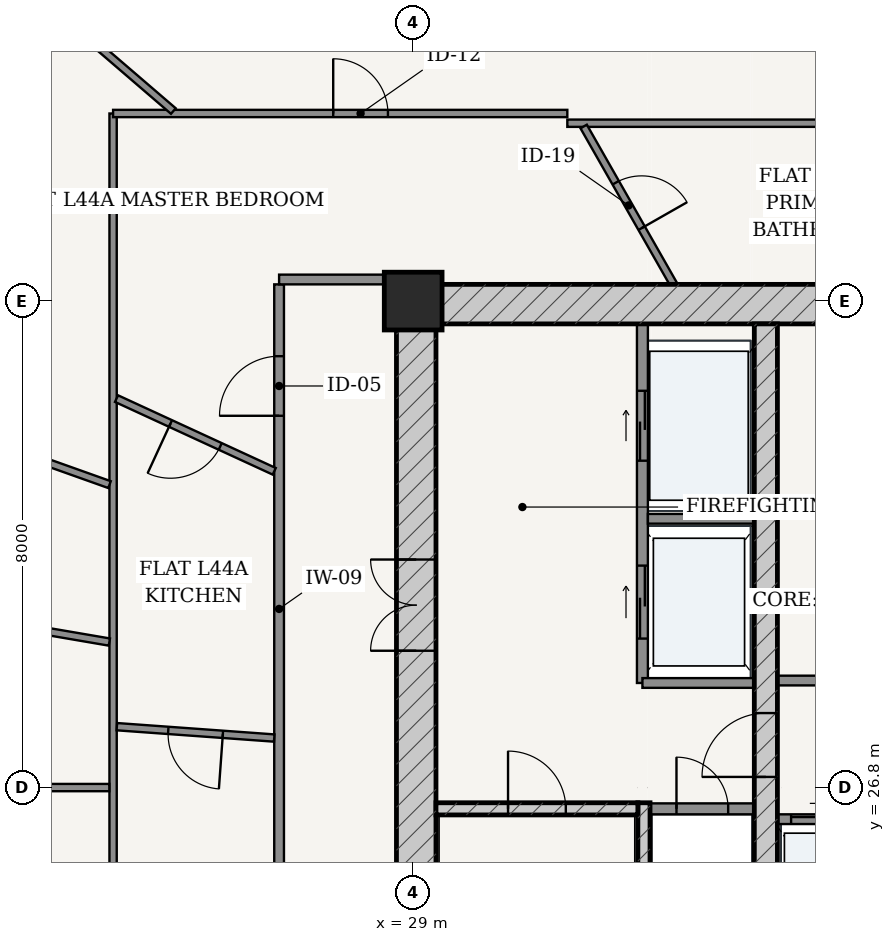
"""IFC4 building model, lengths in metres.
Left out: names, types, materials, properties, quantities, classifications, styles, units other than length and angle.
Written with IfcOpenShell. Run it as: python <this file> out.ifc"""

import sys

from ifc_helpers import new_model, si_unit, direction, frame, frame_2d, origin, origin_2d, place, context, subcontext, project, spatial, rectangle, extrude, source, transform, mapped, element, fill, save


model = new_model("IFC4")
c1 = context("Model", 3, precision=1e-05, world=origin(), true_north=direction((-0.2419218956, 0.970295726276)))
c2 = subcontext(c1, "Body", "Model", "MODEL_VIEW")
j1 = project(units=[si_unit("LENGTHUNIT", "METRE"), si_unit("PLANEANGLEUNIT", "RADIAN")], contexts=[c1])
p1 = place(None, origin())
s1 = spatial("IfcSite", under=j1, at=p1, CompositionType="ELEMENT")
p2 = place(p1, origin())
s2 = spatial("IfcBuilding", under=s1, at=p2, CompositionType="ELEMENT")
p3 = place(p2, frame((0.0, 0.0, 167.8)))
s3 = spatial("IfcBuildingStorey", under=s2, at=p3, CompositionType="ELEMENT", Elevation=167.8)
p4 = place(p3, frame((29.0, 34.8, 0.0), z_axis=(0.0, 0.0, 1.0), x_axis=(1.0, 0.0, 0.0)))
e1 = element("IfcColumn", 1, at=p4, inside=s3, PredefinedType="COLUMN", context=c2, shape_type="SweptSolid", body=[
    extrude(rectangle(XDim=0.95, YDim=0.95, at=origin_2d()), origin(), (0.0, 0.0, 1.0), 3.6),
])
p5 = place(p3, frame((28.725, 34.75, 0.0), z_axis=(0.0, 0.0, 1.0), x_axis=(1.0, 0.0, 0.0)))
e2 = element("IfcWall", 2, at=p5, inside=s3, PredefinedType="SHEAR", context=c2, shape_type="SweptSolid", body=[
    extrude(rectangle(XDim=18.55, YDim=0.65, at=frame_2d((9.275, 0.0))), origin(), (0.0, 0.0, 1.0), 3.33),
])
p6 = place(p3, frame((29.05, 19.175, 0.0), z_axis=(0.0, 0.0, 1.0), x_axis=(0.0, 1.0, 0.0)))
e3 = element("IfcWall", 3, at=p6, inside=s3, PredefinedType="SHEAR", context=c2, shape_type="SweptSolid", body=[
    extrude(rectangle(XDim=15.25, YDim=0.65, at=frame_2d((7.625, 0.0))), origin(), (0.0, 0.0, 1.0), 3.33),
])
p7 = place(p6, frame((9.875, 0.0, 0.0)))
e4 = element("IfcOpeningElement", 4, at=p7, cuts=e3, PredefinedType="OPENING", context=c2, shape_type="SweptSolid", body=[
    extrude(rectangle(XDim=1.5, YDim=2.2, at=frame_2d((0.75, 1.1))), frame((0.0, 0.335, 0.0), z_axis=(0.0, -1.0, 0.0), x_axis=(1.0, 0.0, 0.0)), (0.0, 0.0, 1.0), 0.67),
])
p8 = place(p3, frame((32.795, 19.175, 0.0), z_axis=(0.0, 0.0, 1.0), x_axis=(0.0, 1.0, 0.0)))
e5 = element("IfcWall", 5, at=p8, inside=s3, PredefinedType="SOLIDWALL", context=c2, shape_type="SweptSolid", body=[
    extrude(rectangle(XDim=7.375, YDim=0.2, at=frame_2d((3.688, 0.0))), origin(), (0.0, 0.0, 1.0), 3.33),
])
p9 = place(p3, frame((29.375, 26.45, 0.0), z_axis=(0.0, 0.0, 1.0), x_axis=(1.0, 0.0, 0.0)))
e6 = element("IfcWall", 6, at=p9, inside=s3, PredefinedType="SOLIDWALL", context=c2, shape_type="SweptSolid", body=[
    extrude(rectangle(XDim=3.32, YDim=0.2, at=frame_2d((1.66, 0.0))), origin(), (0.0, 0.0, 1.0), 3.33),
])
p10 = place(p9, frame((1.185, 0.0, 0.0)))
e7 = element("IfcOpeningElement", 7, at=p10, cuts=e6, PredefinedType="OPENING", context=c2, shape_type="SweptSolid", body=[
    extrude(rectangle(XDim=0.95, YDim=2.15, at=frame_2d((0.475, 1.075))), frame((0.0, 0.11, 0.0), z_axis=(0.0, -1.0, 0.0), x_axis=(1.0, 0.0, 0.0)), (0.0, 0.0, 1.0), 0.22),
])
p11 = place(p3, frame((34.8, 19.175, 0.0), z_axis=(0.0, 0.0, 1.0), x_axis=(0.0, 1.0, 0.0)))
e8 = element("IfcWall", 8, at=p11, inside=s3, PredefinedType="SHEAR", context=c2, shape_type="SweptSolid", body=[
    extrude(rectangle(XDim=15.25, YDim=0.38, at=frame_2d((7.625, 0.0))), origin(), (0.0, 0.0, 1.0), 3.33),
])
p12 = place(p11, frame((7.8, 0.0, 0.0)))
e9 = element("IfcOpeningElement", 9, at=p12, cuts=e8, PredefinedType="OPENING", context=c2, shape_type="SweptSolid", body=[
    extrude(rectangle(XDim=1.05, YDim=2.15, at=frame_2d((0.525, 1.075))), frame((0.0, 0.2, 0.0), z_axis=(0.0, -1.0, 0.0), x_axis=(1.0, 0.0, 0.0)), (0.0, 0.0, 1.0), 0.4),
])
p13 = place(p3, frame((24.633, 44.122, 0.0), z_axis=(0.0, 0.0, 1.0), x_axis=(-0.75843401647, -0.651749831348, 0.0)))
e10 = element("IfcWall", 10, at=p13, inside=s3, PredefinedType="SOLIDWALL", context=c2, shape_type="SweptSolid", body=[
    extrude(rectangle(XDim=8.952, YDim=0.28, at=frame_2d((4.476, 0.0))), origin(), (0.0, 0.0, 1.0), 3.33),
])
p14 = place(p13, frame((1.367, 0.0, 0.85)))
e11 = element("IfcOpeningElement", 11, at=p14, cuts=e10, PredefinedType="OPENING", context=c2, shape_type="SweptSolid", body=[
    extrude(rectangle(XDim=2.1, YDim=1.95, at=frame_2d((1.05, 0.975))), frame((0.0, 0.15, 0.0), z_axis=(0.0, -1.0, 0.0), x_axis=(1.0, 0.0, 0.0)), (0.0, 0.0, 1.0), 0.3),
])
p15 = place(p13, frame((5.485, 0.0, 0.85)))
e12 = element("IfcOpeningElement", 12, at=p15, cuts=e10, PredefinedType="OPENING", context=c2, shape_type="SweptSolid", body=[
    extrude(rectangle(XDim=2.1, YDim=1.95, at=frame_2d((1.05, 0.975))), frame((0.0, 0.15, 0.0), z_axis=(0.0, -1.0, 0.0), x_axis=(1.0, 0.0, 0.0)), (0.0, 0.0, 1.0), 0.3),
])
p16 = place(p3, frame((32.9, 26.45, 0.0), z_axis=(0.0, 0.0, 1.0), x_axis=(1.0, 0.0, 0.0)))
e13 = element("IfcWall", 13, at=p16, inside=s3, PredefinedType="PARTITIONING", context=c2, shape_type="SweptSolid", body=[
    extrude(rectangle(XDim=1.71, YDim=0.18, at=frame_2d((0.855, 0.0))), origin(), (0.0, 0.0, 1.0), 3.33),
])
p17 = place(p16, frame((0.43, 0.0, 0.0)))
e14 = element("IfcOpeningElement", 14, at=p17, cuts=e13, PredefinedType="OPENING", context=c2, shape_type="SweptSolid", body=[
    extrude(rectangle(XDim=0.85, YDim=2.1, at=frame_2d((0.425, 1.05))), frame((0.0, 0.1, 0.0), z_axis=(0.0, -1.0, 0.0), x_axis=(1.0, 0.0, 0.0)), (0.0, 0.0, 1.0), 0.2),
])
p18 = place(p3, frame((32.77, 28.52, 0.0), z_axis=(0.0, 0.0, 1.0), x_axis=(0.0, 1.0, 0.0)))
e15 = element("IfcWall", 15, at=p18, inside=s3, PredefinedType="PARTITIONING", context=c2, shape_type="SweptSolid", body=[
    extrude(rectangle(XDim=5.905, YDim=0.18, at=frame_2d((2.953, 0.0))), origin(), (0.0, 0.0, 1.0), 3.33),
])
p19 = place(p18, frame((3.655, 0.0, 0.0)))
e16 = element("IfcOpeningElement", 16, at=p19, cuts=e15, PredefinedType="OPENING", context=c2, shape_type="SweptSolid", body=[
    extrude(rectangle(XDim=1.15, YDim=2.2, at=frame_2d((0.575, 1.1))), frame((0.0, 0.1, 0.0), z_axis=(0.0, -1.0, 0.0), x_axis=(1.0, 0.0, 0.0)), (0.0, 0.0, 1.0), 0.2),
])
p20 = place(p18, frame((0.73, 0.0, 0.0)))
e17 = element("IfcOpeningElement", 17, at=p20, cuts=e15, PredefinedType="OPENING", context=c2, shape_type="SweptSolid", body=[
    extrude(rectangle(XDim=1.2, YDim=2.25, at=frame_2d((0.6, 1.125))), frame((0.0, 0.1, 0.0), z_axis=(0.0, -1.0, 0.0), x_axis=(1.0, 0.0, 0.0)), (0.0, 0.0, 1.0), 0.2),
])
p21 = place(p3, frame((32.86, 31.22, 0.0), z_axis=(0.0, 0.0, 1.0), x_axis=(1.0, 0.0, 0.0)))
e18 = element("IfcWall", 18, at=p21, inside=s3, PredefinedType="PARTITIONING", context=c2, shape_type="SweptSolid", body=[
    extrude(rectangle(XDim=1.75, YDim=0.16, at=frame_2d((0.875, 0.0))), origin(), (0.0, 0.0, 1.0), 3.33),
])
p22 = place(p3, frame((32.77, 28.52, 0.0), z_axis=(0.0, 0.0, 1.0), x_axis=(1.0, 0.0, 0.0)))
e19 = element("IfcWall", 19, at=p22, inside=s3, PredefinedType="PARTITIONING", context=c2, shape_type="SweptSolid", body=[
    extrude(rectangle(XDim=1.84, YDim=0.16, at=frame_2d((0.92, 0.0))), origin(), (0.0, 0.0, 1.0), 3.33),
])
p23 = place(p3, frame((34.99, 28.56, 0.0), z_axis=(0.0, 0.0, 1.0), x_axis=(1.0, 0.0, 0.0)))
e20 = element("IfcWall", 20, at=p23, inside=s3, PredefinedType="PARTITIONING", context=c2, shape_type="SweptSolid", body=[
    extrude(rectangle(XDim=6.02, YDim=0.16, at=frame_2d((3.01, 0.0))), origin(), (0.0, 0.0, 1.0), 3.33),
])
p24 = place(p23, frame((1.025, 0.0, 0.0)))
e21 = element("IfcOpeningElement", 21, at=p24, cuts=e20, PredefinedType="OPENING", context=c2, shape_type="SweptSolid", body=[
    extrude(rectangle(XDim=0.86, YDim=2.1, at=frame_2d((0.43, 1.05))), frame((0.0, 0.09, 0.0), z_axis=(0.0, -1.0, 0.0), x_axis=(1.0, 0.0, 0.0)), (0.0, 0.0, 1.0), 0.18),
])
p25 = place(p23, frame((4.14, 0.0, 0.0)))
e22 = element("IfcOpeningElement", 22, at=p25, cuts=e20, PredefinedType="OPENING", context=c2, shape_type="SweptSolid", body=[
    extrude(rectangle(XDim=0.85, YDim=2.1, at=frame_2d((0.425, 1.05))), frame((0.0, 0.09, 0.0), z_axis=(0.0, -1.0, 0.0), x_axis=(1.0, 0.0, 0.0)), (0.0, 0.0, 1.0), 0.18),
])
p26 = place(p3, frame((34.99, 26.28, 0.0), z_axis=(0.0, 0.0, 1.0), x_axis=(1.0, 0.0, 0.0)))
e23 = element("IfcWall", 23, at=p26, inside=s3, PredefinedType="PARTITIONING", context=c2, shape_type="SweptSolid", body=[
    extrude(rectangle(XDim=6.02, YDim=0.16, at=frame_2d((3.01, 0.0))), origin(), (0.0, 0.0, 1.0), 3.33),
])
p27 = place(p26, frame((0.225, 0.0, 0.0)))
e24 = element("IfcOpeningElement", 24, at=p27, cuts=e23, PredefinedType="OPENING", context=c2, shape_type="SweptSolid", body=[
    extrude(rectangle(XDim=1.1, YDim=2.2, at=frame_2d((0.55, 1.1))), frame((0.0, 0.09, 0.0), z_axis=(0.0, -1.0, 0.0), x_axis=(1.0, 0.0, 0.0)), (0.0, 0.0, 1.0), 0.18),
])
p28 = place(p26, frame((1.705, 0.0, 0.0)))
e25 = element("IfcOpeningElement", 25, at=p28, cuts=e23, PredefinedType="OPENING", context=c2, shape_type="SweptSolid", body=[
    extrude(rectangle(XDim=1.1, YDim=2.2, at=frame_2d((0.55, 1.1))), frame((0.0, 0.09, 0.0), z_axis=(0.0, -1.0, 0.0), x_axis=(1.0, 0.0, 0.0)), (0.0, 0.0, 1.0), 0.18),
])
p29 = place(p3, frame((26.795, 24.4, 0.0), z_axis=(0.0, 0.0, 1.0), x_axis=(0.0, 1.0, 0.0)))
e26 = element("IfcWall", 26, at=p29, inside=s3, PredefinedType="PARTITIONING", context=c2, shape_type="SweptSolid", body=[
    extrude(rectangle(XDim=10.675, YDim=0.16, at=frame_2d((5.337, 0.0))), origin(), (0.0, 0.0, 1.0), 2.776),
])
p30 = place(p29, frame((8.514, 0.0, 0.0)))
e27 = element("IfcOpeningElement", 27, at=p30, cuts=e26, PredefinedType="OPENING", context=c2, shape_type="SweptSolid", body=[
    extrude(rectangle(XDim=0.98, YDim=2.2, at=frame_2d((0.49, 1.1))), frame((0.0, 0.09, 0.0), z_axis=(0.0, -1.0, 0.0), x_axis=(1.0, 0.0, 0.0)), (0.0, 0.0, 1.0), 0.18),
])
p31 = place(p3, frame((26.795, 35.155, 0.0), z_axis=(0.0, 0.0, 1.0), x_axis=(1.0, 0.0, 0.0)))
e28 = element("IfcWall", 28, at=p31, inside=s3, PredefinedType="PARTITIONING", context=c2, shape_type="SweptSolid", body=[
    extrude(rectangle(XDim=1.93, YDim=0.16, at=frame_2d((0.965, 0.0))), origin(), (0.0, 0.0, 1.0), 2.776),
])
p32 = place(p3, frame((24.065, 21.59, 0.0), z_axis=(0.0, 0.0, 1.0), x_axis=(0.0, 1.0, 0.0)))
e29 = element("IfcWall", 29, at=p32, inside=s3, PredefinedType="PARTITIONING", context=c2, shape_type="SweptSolid", body=[
    extrude(rectangle(XDim=16.295, YDim=0.12, at=frame_2d((8.147, 0.0))), origin(), (0.0, 0.0, 1.0), 2.776),
])
p33 = place(p3, frame((24.065, 37.885, 0.0), z_axis=(0.0, 0.0, 1.0), x_axis=(1.0, 0.0, 0.0)))
e30 = element("IfcWall", 30, at=p33, inside=s3, PredefinedType="PARTITIONING", context=c2, shape_type="SweptSolid", body=[
    extrude(rectangle(XDim=7.47, YDim=0.12, at=frame_2d((3.735, 0.0))), origin(), (0.0, 0.0, 1.0), 2.776),
])
p34 = place(p33, frame((3.62, 0.0, 0.0)))
e31 = element("IfcOpeningElement", 31, at=p34, cuts=e30, PredefinedType="OPENING", context=c2, shape_type="SweptSolid", body=[
    extrude(rectangle(XDim=0.9, YDim=2.15, at=frame_2d((0.45, 1.075))), frame((0.0, 0.07, 0.0), z_axis=(0.0, -1.0, 0.0), x_axis=(1.0, 0.0, 0.0)), (0.0, 0.0, 1.0), 0.14),
])
p35 = place(p3, frame((31.535, 37.725, 0.0), z_axis=(0.0, 0.0, 1.0), x_axis=(1.0, 0.0, 0.0)))
e32 = element("IfcWall", 32, at=p35, inside=s3, PredefinedType="PARTITIONING", context=c2, shape_type="SweptSolid", body=[
    extrude(rectangle(XDim=6.363, YDim=0.12, at=frame_2d((3.182, 0.0))), origin(), (0.0, 0.0, 1.0), 2.776),
])
p36 = place(p3, frame((25.056, 37.925, 0.0), z_axis=(0.0, 0.0, 1.0), x_axis=(-0.758354915574, 0.65184186888, 0.0)))
e33 = element("IfcWall", 33, at=p36, inside=s3, PredefinedType="PARTITIONING", context=c2, shape_type="SweptSolid", body=[
    extrude(rectangle(XDim=5.432, YDim=0.12, at=frame_2d((2.716, 0.0))), origin(), (0.0, 0.0, 1.0), 2.846),
])
p37 = place(p36, frame((2.266, 0.0, 0.0)))
e34 = element("IfcOpeningElement", 34, at=p37, cuts=e33, PredefinedType="OPENING", context=c2, shape_type="SweptSolid", body=[
    extrude(rectangle(XDim=0.9, YDim=2.15, at=frame_2d((0.45, 1.075))), frame((0.0, 0.07, 0.0), z_axis=(0.0, -1.0, 0.0), x_axis=(1.0, 0.0, 0.0)), (0.0, 0.0, 1.0), 0.14),
])
p38 = place(p3, frame((24.007, 31.782, 0.0), z_axis=(0.0, 0.0, 1.0), x_axis=(-0.942077868165, 0.335394231187, 0.0)))
e35 = element("IfcWall", 35, at=p38, inside=s3, PredefinedType="PARTITIONING", context=c2, shape_type="SweptSolid", body=[
    extrude(rectangle(XDim=8.817, YDim=0.12, at=frame_2d((4.408, 0.0))), origin(), (0.0, 0.0, 1.0), 2.846),
])
p39 = place(p38, frame((3.958, 0.0, 0.0)))
e36 = element("IfcOpeningElement", 36, at=p39, cuts=e35, PredefinedType="OPENING", context=c2, shape_type="SweptSolid", body=[
    extrude(rectangle(XDim=0.9, YDim=2.15, at=frame_2d((0.45, 1.075))), frame((0.0, 0.07, 0.0), z_axis=(0.0, -1.0, 0.0), x_axis=(1.0, 0.0, 0.0)), (0.0, 0.0, 1.0), 0.14),
])
p40 = place(p3, frame((24.004, 29.193, 0.0), z_axis=(0.0, 0.0, 1.0), x_axis=(-0.985698378271, 0.168519159369, 0.0)))
e37 = element("IfcWall", 37, at=p40, inside=s3, PredefinedType="PARTITIONING", context=c2, shape_type="SweptSolid", body=[
    extrude(rectangle(XDim=9.769, YDim=0.12, at=frame_2d((4.884, 0.0))), origin(), (0.0, 0.0, 1.0), 2.776),
])
p41 = place(p40, frame((3.428, 0.0, 0.0)))
e38 = element("IfcOpeningElement", 38, at=p41, cuts=e37, PredefinedType="OPENING", context=c2, shape_type="SweptSolid", body=[
    extrude(rectangle(XDim=0.9, YDim=2.15, at=frame_2d((0.45, 1.075))), frame((0.0, 0.07, 0.0), z_axis=(0.0, -1.0, 0.0), x_axis=(1.0, 0.0, 0.0)), (0.0, 0.0, 1.0), 0.14),
])
p42 = place(p3, frame((24.003, 26.8, 0.0), z_axis=(0.0, 0.0, 1.0), x_axis=(-1.0, 0.0, 0.0)))
e39 = element("IfcWall", 39, at=p42, inside=s3, PredefinedType="PARTITIONING", context=c2, shape_type="SweptSolid", body=[
    extrude(rectangle(XDim=10.143, YDim=0.12, at=frame_2d((5.071, 0.0))), origin(), (0.0, 0.0, 1.0), 2.846),
])
p43 = place(p42, frame((4.622, 0.0, 0.0)))
e40 = element("IfcOpeningElement", 40, at=p43, cuts=e39, PredefinedType="OPENING", context=c2, shape_type="SweptSolid", body=[
    extrude(rectangle(XDim=0.9, YDim=2.15, at=frame_2d((0.45, 1.075))), frame((0.0, 0.07, 0.0), z_axis=(0.0, -1.0, 0.0), x_axis=(1.0, 0.0, 0.0)), (0.0, 0.0, 1.0), 0.14),
])
p44 = place(p3, frame((33.283, 35.075, 0.0), z_axis=(0.0, 0.0, 1.0), x_axis=(-0.495179611311, 0.868790626412, 0.0)))
e41 = element("IfcWall", 41, at=p44, inside=s3, PredefinedType="PARTITIONING", context=c2, shape_type="SweptSolid", body=[
    extrude(rectangle(XDim=2.988, YDim=0.12, at=frame_2d((1.494, 0.0))), origin(), (0.0, 0.0, 1.0), 3.33),
])
p45 = place(p44, frame((1.064, 0.0, 0.0)))
e42 = element("IfcOpeningElement", 42, at=p45, cuts=e41, PredefinedType="OPENING", context=c2, shape_type="SweptSolid", body=[
    extrude(rectangle(XDim=0.86, YDim=2.15, at=frame_2d((0.43, 1.075))), frame((0.0, 0.07, 0.0), z_axis=(0.0, -1.0, 0.0), x_axis=(1.0, 0.0, 0.0)), (0.0, 0.0, 1.0), 0.14),
])
p46 = place(p3, frame((26.715, 32.001, 0.0), z_axis=(0.0, 0.0, 1.0), x_axis=(-0.90819942915, 0.418537688735, 0.0)))
e43 = element("IfcWall", 43, at=p46, inside=s3, PredefinedType="PARTITIONING", context=c2, shape_type="SweptSolid", body=[
    extrude(rectangle(XDim=2.856, YDim=0.12, at=frame_2d((1.428, 0.0))), origin(), (0.0, 0.0, 1.0), 3.33),
])
p47 = place(p46, frame((0.978, 0.0, 0.0)))
e44 = element("IfcOpeningElement", 44, at=p47, cuts=e43, PredefinedType="OPENING", context=c2, shape_type="SweptSolid", body=[
    extrude(rectangle(XDim=0.9, YDim=2.15, at=frame_2d((0.45, 1.075))), frame((0.0, 0.07, 0.0), z_axis=(0.0, -1.0, 0.0), x_axis=(1.0, 0.0, 0.0)), (0.0, 0.0, 1.0), 0.14),
])
p48 = place(p3, frame((26.715, 27.615, 0.0), z_axis=(0.0, 0.0, 1.0), x_axis=(-0.997406375801, 0.071975839778, 0.0)))
e45 = element("IfcWall", 45, at=p48, inside=s3, PredefinedType="PARTITIONING", context=c2, shape_type="SweptSolid", body=[
    extrude(rectangle(XDim=2.595, YDim=0.12, at=frame_2d((1.297, 0.0))), origin(), (0.0, 0.0, 1.0), 3.33),
])
p49 = place(p48, frame((0.847, 0.0, 0.0)))
e46 = element("IfcOpeningElement", 46, at=p49, cuts=e45, PredefinedType="OPENING", context=c2, shape_type="SweptSolid", body=[
    extrude(rectangle(XDim=0.9, YDim=2.15, at=frame_2d((0.45, 1.075))), frame((0.0, 0.07, 0.0), z_axis=(0.0, -1.0, 0.0), x_axis=(1.0, 0.0, 0.0)), (0.0, 0.0, 1.0), 0.14),
])
m1 = source(origin(), c2, "Body", "SweptSolid", [
    extrude(rectangle(XDim=1.5, YDim=2.2, at=frame_2d((0.75, 1.1))), frame((0.0, 0.025, 0.0), z_axis=(0.0, -1.0, 0.0), x_axis=(1.0, 0.0, 0.0)), (0.0, 0.0, 1.0), 0.05),
])
p50 = place(p7, origin())
e47 = element("IfcDoor", 47, at=p50, inside=s3, OperationType="DOUBLE_DOOR_SINGLE_SWING", PredefinedType="DOOR", context=c2, shape_type="MappedRepresentation", body=[
    mapped(m1, transform((0.0, 0.0, 0.0), scale=1.0)),
])
fill(e4, e47)
m2 = source(origin(), c2, "Body", "SweptSolid", [
    extrude(rectangle(XDim=1.05, YDim=2.15, at=frame_2d((0.525, 1.075))), frame((0.0, 0.025, 0.0), z_axis=(0.0, -1.0, 0.0), x_axis=(1.0, 0.0, 0.0)), (0.0, 0.0, 1.0), 0.05),
])
p51 = place(p12, origin())
e48 = element("IfcDoor", 48, at=p51, inside=s3, OperationType="SINGLE_SWING_LEFT", PredefinedType="DOOR", context=c2, shape_type="MappedRepresentation", body=[
    mapped(m2, transform((0.0, 0.0, 0.0), scale=1.0)),
])
fill(e9, e48)
m3 = source(origin(), c2, "Body", "SweptSolid", [
    extrude(rectangle(XDim=0.95, YDim=2.15, at=frame_2d((0.475, 1.075))), frame((0.0, 0.025, 0.0), z_axis=(0.0, -1.0, 0.0), x_axis=(1.0, 0.0, 0.0)), (0.0, 0.0, 1.0), 0.05),
])
p52 = place(p10, origin())
e49 = element("IfcDoor", 49, at=p52, inside=s3, OperationType="SINGLE_SWING_LEFT", PredefinedType="DOOR", context=c2, shape_type="MappedRepresentation", body=[
    mapped(m3, transform((0.0, 0.0, 0.0), scale=1.0)),
])
fill(e7, e49)
m4 = source(origin(), c2, "Body", "SweptSolid", [
    extrude(rectangle(XDim=0.85, YDim=2.1, at=frame_2d((0.425, 1.05))), frame((0.0, 0.025, 0.0), z_axis=(0.0, -1.0, 0.0), x_axis=(1.0, 0.0, 0.0)), (0.0, 0.0, 1.0), 0.05),
])
p53 = place(p17, origin())
e50 = element("IfcDoor", 50, at=p53, inside=s3, OperationType="SINGLE_SWING_LEFT", PredefinedType="DOOR", context=c2, shape_type="MappedRepresentation", body=[
    mapped(m4, transform((0.0, 0.0, 0.0), scale=1.0)),
])
fill(e14, e50)
m5 = source(origin(), c2, "Body", "SweptSolid", [
    extrude(rectangle(XDim=1.15, YDim=2.2, at=frame_2d((0.575, 1.1))), frame((0.0, 0.025, 0.0), z_axis=(0.0, -1.0, 0.0), x_axis=(1.0, 0.0, 0.0)), (0.0, 0.0, 1.0), 0.05),
])
p54 = place(p19, origin())
e51 = element("IfcDoor", 51, at=p54, inside=s3, OperationType="DOUBLE_DOOR_SLIDING", PredefinedType="DOOR", context=c2, shape_type="MappedRepresentation", body=[
    mapped(m5, transform((0.0, 0.0, 0.0), scale=1.0)),
])
fill(e16, e51)
m6 = source(origin(), c2, "Body", "SweptSolid", [
    extrude(rectangle(XDim=1.2, YDim=2.25, at=frame_2d((0.6, 1.125))), frame((0.0, 0.025, 0.0), z_axis=(0.0, -1.0, 0.0), x_axis=(1.0, 0.0, 0.0)), (0.0, 0.0, 1.0), 0.05),
])
p55 = place(p20, origin())
e52 = element("IfcDoor", 52, at=p55, inside=s3, OperationType="DOUBLE_DOOR_SLIDING", PredefinedType="DOOR", context=c2, shape_type="MappedRepresentation", body=[
    mapped(m6, transform((0.0, 0.0, 0.0), scale=1.0)),
])
fill(e17, e52)
m7 = source(origin(), c2, "Body", "SweptSolid", [
    extrude(rectangle(XDim=1.1, YDim=2.2, at=frame_2d((0.55, 1.1))), frame((0.0, 0.025, 0.0), z_axis=(0.0, -1.0, 0.0), x_axis=(1.0, 0.0, 0.0)), (0.0, 0.0, 1.0), 0.05),
])
p56 = place(p27, origin())
e53 = element("IfcDoor", 53, at=p56, inside=s3, OperationType="DOUBLE_DOOR_SLIDING", PredefinedType="DOOR", context=c2, shape_type="MappedRepresentation", body=[
    mapped(m7, transform((0.0, 0.0, 0.0), scale=1.0)),
])
fill(e24, e53)
m8 = source(origin(), c2, "Body", "SweptSolid", [
    extrude(rectangle(XDim=0.98, YDim=2.2, at=frame_2d((0.49, 1.1))), frame((0.0, 0.025, 0.0), z_axis=(0.0, -1.0, 0.0), x_axis=(1.0, 0.0, 0.0)), (0.0, 0.0, 1.0), 0.05),
])
p57 = place(p30, origin())
e54 = element("IfcDoor", 54, at=p57, inside=s3, OperationType="SINGLE_SWING_LEFT", PredefinedType="DOOR", context=c2, shape_type="MappedRepresentation", body=[
    mapped(m8, transform((0.0, 0.0, 0.0), scale=1.0)),
])
fill(e27, e54)
m9 = source(origin(), c2, "Body", "SweptSolid", [
    extrude(rectangle(XDim=0.86, YDim=2.15, at=frame_2d((0.43, 1.075))), frame((0.0, 0.025, 0.0), z_axis=(0.0, -1.0, 0.0), x_axis=(1.0, 0.0, 0.0)), (0.0, 0.0, 1.0), 0.05),
])
p58 = place(p45, frame((0.86, 0.0, 0.0), z_axis=(0.0, 0.0, 1.0), x_axis=(-1.0, 0.0, 0.0)))
e55 = element("IfcDoor", 55, at=p58, inside=s3, OperationType="SINGLE_SWING_RIGHT", PredefinedType="DOOR", context=c2, shape_type="MappedRepresentation", body=[
    mapped(m9, transform((0.0, 0.0, 0.0), scale=1.0)),
])
fill(e42, e55)
m10 = source(origin(), c2, "Body", "SweptSolid", [
    extrude(rectangle(XDim=0.9, YDim=2.15, at=frame_2d((0.45, 1.075))), frame((0.0, 0.025, 0.0), z_axis=(0.0, -1.0, 0.0), x_axis=(1.0, 0.0, 0.0)), (0.0, 0.0, 1.0), 0.05),
])
p59 = place(p34, origin())
e56 = element("IfcDoor", 56, at=p59, inside=s3, OperationType="SINGLE_SWING_LEFT", PredefinedType="DOOR", context=c2, shape_type="MappedRepresentation", body=[
    mapped(m10, transform((0.0, 0.0, 0.0), scale=1.0)),
])
fill(e31, e56)
p60 = place(p47, origin())
e57 = element("IfcDoor", 57, at=p60, inside=s3, OperationType="SINGLE_SWING_RIGHT", PredefinedType="DOOR", context=c2, shape_type="MappedRepresentation", body=[
    mapped(m10, transform((0.0, 0.0, 0.0), scale=1.0)),
])
fill(e44, e57)
p61 = place(p49, origin())
e58 = element("IfcDoor", 58, at=p61, inside=s3, OperationType="SINGLE_SWING_LEFT", PredefinedType="DOOR", context=c2, shape_type="MappedRepresentation", body=[
    mapped(m10, transform((0.0, 0.0, 0.0), scale=1.0)),
])
fill(e46, e58)
save(model, sys.argv[1])
